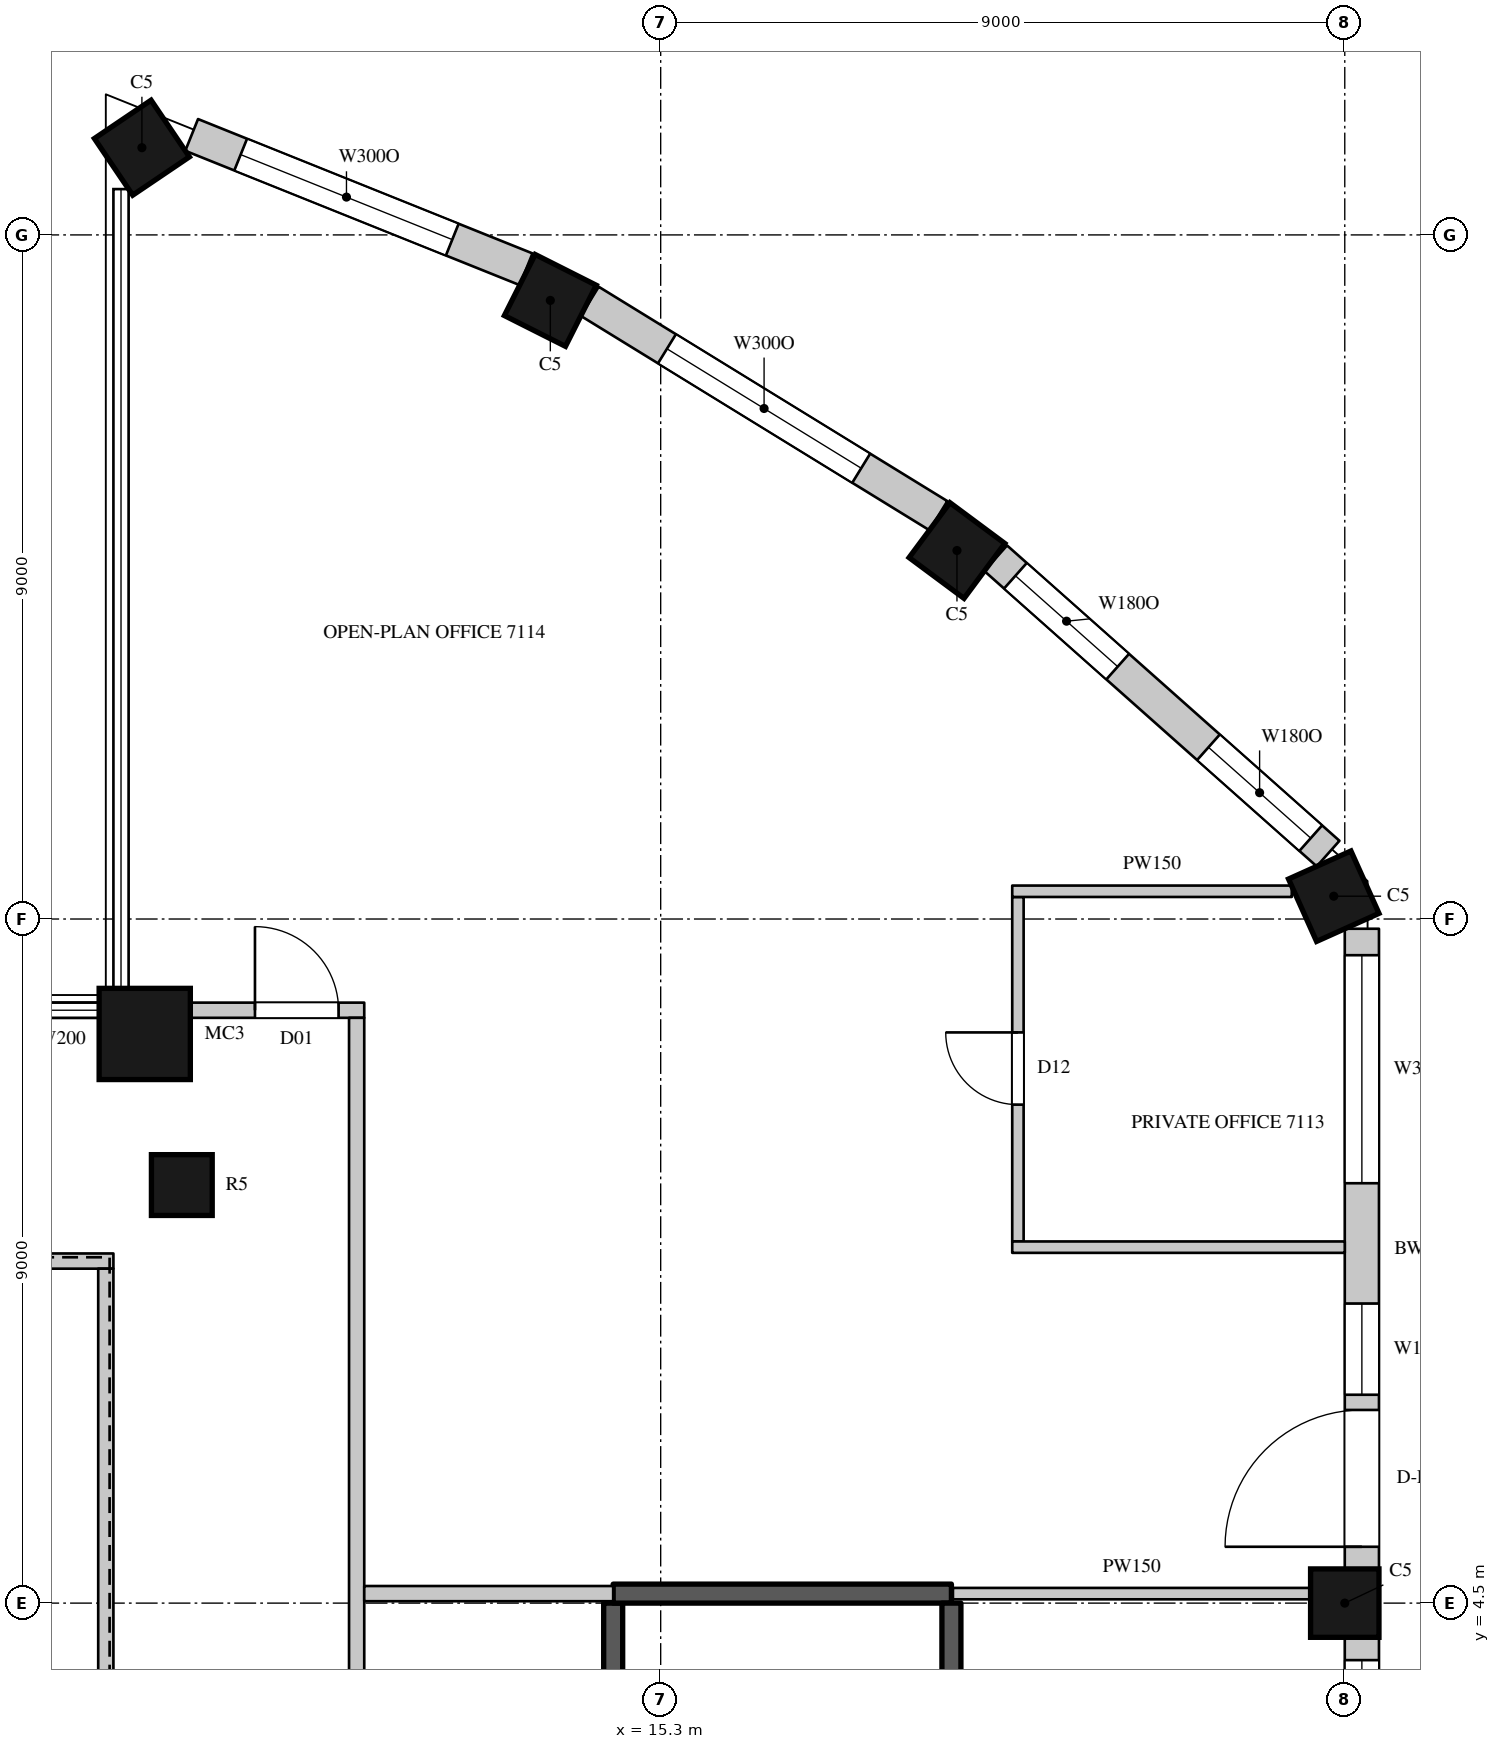
"""IFC4 building model, lengths in metres.
Left out: names, types, materials, properties, quantities, classifications, styles, units other than length and angle.
Written with IfcOpenShell. Run it as: python <this file> out.ifc"""

import sys

from ifc_helpers import new_model, si_unit, direction, frame, frame_2d, origin, origin_2d, place, context, subcontext, project, spatial, rectangle, circle, extrude, element, fill, save


model = new_model("IFC4")
c1 = context("Model", 3, precision=1e-05, world=origin(), true_north=direction((0.0, 1.0)))
c2 = subcontext(c1, "Body", "Model", "MODEL_VIEW")
j1 = project(units=[si_unit("LENGTHUNIT", "METRE"), si_unit("PLANEANGLEUNIT", "RADIAN")], contexts=[c1])
p1 = place(None, origin())
s1 = spatial("IfcSite", under=j1, at=p1, CompositionType="ELEMENT")
p2 = place(p1, origin())
s2 = spatial("IfcBuilding", under=s1, at=p2, CompositionType="ELEMENT")
p3 = place(p2, frame((0.0, 0.0, 313.1)))
s3 = spatial("IfcBuildingStorey", under=s2, at=p3, CompositionType="ELEMENT", Elevation=313.1)
p4 = place(p3, frame((8.475, 23.647, 0.0), z_axis=(0.0, 0.0, 1.0), x_axis=(-0.828469606019, -0.560034027451, 0.0)))
e1 = element("IfcColumn", 1, at=p4, inside=s3, PredefinedType="COLUMN", context=c2, shape_type="SweptSolid", body=[
    extrude(rectangle(XDim=0.9, YDim=0.9, at=origin_2d()), origin(), (0.0, 0.0, 1.0), 4.1),
])
p5 = place(p3, frame((8.512, 11.988, 0.0), z_axis=(0.0, 0.0, 1.0), x_axis=(1.0, 0.0, 0.0)))
e2 = element("IfcColumn", 2, at=p5, inside=s3, PredefinedType="COLUMN", context=c2, shape_type="SweptSolid", body=[
    extrude(circle(Radius=0.6, at=origin_2d()), origin(), (0.0, 0.0, 1.0), 4.1),
])
for number, where, z_axis, x_axis in (
    (3, (24.3, 4.5, 0.0), (0.0, 0.0, 1.0), (0.0, 1.0, 0.0)),
    (4, (24.155, 13.8, 0.0), (0.0, 0.0, 1.0), (-0.41, 0.912, 0.0)),
    (5, (19.198, 18.348, 0.0), (0.0, 0.0, 1.0), (-0.803, 0.596, 0.0)),
    (6, (13.848, 21.638, 0.0), (0.0, 0.0, 1.0), (-0.893, 0.45, 0.0)),
):
    element("IfcColumn", number, at=place(p3, frame(where, z_axis=z_axis, x_axis=x_axis)), inside=s3, PredefinedType="COLUMN", context=c2, shape_type="SweptSolid", body=[
        extrude(rectangle(XDim=0.9, YDim=0.9, at=origin_2d()), origin(), (0.0, 0.0, 1.0), 4.1),
    ])
p6 = place(p3, frame((9.0, 10.0, 0.0), z_axis=(0.0, 0.0, 1.0), x_axis=(1.0, 0.0, 0.0)))
e7 = element("IfcColumn", 7, at=p6, inside=s3, PredefinedType="COLUMN", context=c2, shape_type="SweptSolid", body=[
    extrude(circle(Radius=0.4, at=origin_2d()), origin(), (0.0, 0.0, 1.0), 4.1),
])
p7 = place(p3, frame((24.525, -4.05, 0.0), z_axis=(0.0, 0.0, 1.0), x_axis=(0.0, 1.0, 0.0)))
e8 = element("IfcWall", 8, at=p7, inside=s3, PredefinedType="SOLIDWALL", context=c2, shape_type="SweptSolid", body=[
    extrude(rectangle(XDim=8.1, YDim=0.45, at=frame_2d((4.05, 0.0))), origin(), (0.0, 0.0, 1.0), 3.8),
])
p8 = place(p7, frame((0.3, 0.0, 1.05)))
e9 = element("IfcOpeningElement", 9, at=p8, cuts=e8, PredefinedType="OPENING", context=c2, shape_type="SweptSolid", body=[
    extrude(rectangle(XDim=3.0, YDim=2.4, at=frame_2d((1.5, 1.2))), frame((0.0, 0.235, 0.0), z_axis=(0.0, -1.0, 0.0), x_axis=(1.0, 0.0, 0.0)), (0.0, 0.0, 1.0), 0.47),
])
p9 = place(p7, frame((4.8, 0.0, 1.05)))
e10 = element("IfcOpeningElement", 10, at=p9, cuts=e8, PredefinedType="OPENING", context=c2, shape_type="SweptSolid", body=[
    extrude(rectangle(XDim=3.0, YDim=2.4, at=frame_2d((1.5, 1.2))), frame((0.0, 0.235, 0.0), z_axis=(0.0, -1.0, 0.0), x_axis=(1.0, 0.0, 0.0)), (0.0, 0.0, 1.0), 0.47),
])
p10 = place(p3, frame((24.525, 4.95, 0.0), z_axis=(0.0, 0.0, 1.0), x_axis=(0.0, 1.0, 0.0)))
e11 = element("IfcWall", 11, at=p10, inside=s3, PredefinedType="SOLIDWALL", context=c2, shape_type="SweptSolid", body=[
    extrude(rectangle(XDim=8.422, YDim=0.45, at=frame_2d((4.211, 0.0))), origin(), (0.0, 0.0, 1.0), 3.8),
])
p11 = place(p10, frame((0.291, 0.0, 0.0)))
e12 = element("IfcOpeningElement", 12, at=p11, cuts=e11, PredefinedType="OPENING", context=c2, shape_type="SweptSolid", body=[
    extrude(rectangle(XDim=1.8, YDim=2.4, at=frame_2d((0.9, 1.2))), frame((0.0, 0.235, 0.0), z_axis=(0.0, -1.0, 0.0), x_axis=(1.0, 0.0, 0.0)), (0.0, 0.0, 1.0), 0.47),
])
p12 = place(p10, frame((2.291, 0.0, 1.05)))
e13 = element("IfcOpeningElement", 13, at=p12, cuts=e11, PredefinedType="OPENING", context=c2, shape_type="SweptSolid", body=[
    extrude(rectangle(XDim=1.2, YDim=2.4, at=frame_2d((0.6, 1.2))), frame((0.0, 0.235, 0.0), z_axis=(0.0, -1.0, 0.0), x_axis=(1.0, 0.0, 0.0)), (0.0, 0.0, 1.0), 0.47),
])
p13 = place(p10, frame((5.074, 0.0, 1.05)))
e14 = element("IfcOpeningElement", 14, at=p13, cuts=e11, PredefinedType="OPENING", context=c2, shape_type="SweptSolid", body=[
    extrude(rectangle(XDim=3.0, YDim=2.4, at=frame_2d((1.5, 1.2))), frame((0.0, 0.235, 0.0), z_axis=(0.0, -1.0, 0.0), x_axis=(1.0, 0.0, 0.0)), (0.0, 0.0, 1.0), 0.47),
])
p14 = place(p3, frame((24.081, 14.361, 0.0), z_axis=(0.0, 0.0, 1.0), x_axis=(-0.747570482973, 0.664182484704, 0.0)))
e15 = element("IfcWall", 15, at=p14, inside=s3, PredefinedType="SOLIDWALL", context=c2, shape_type="SweptSolid", body=[
    extrude(rectangle(XDim=5.85, YDim=0.45, at=frame_2d((2.925, 0.0))), origin(), (0.0, 0.0, 1.0), 3.8),
])
p15 = place(p14, frame((0.305, 0.0, 1.05)))
e16 = element("IfcOpeningElement", 16, at=p15, cuts=e15, PredefinedType="OPENING", context=c2, shape_type="SweptSolid", body=[
    extrude(rectangle(XDim=1.8, YDim=2.4, at=frame_2d((0.9, 1.2))), frame((0.0, 0.235, 0.0), z_axis=(0.0, -1.0, 0.0), x_axis=(1.0, 0.0, 0.0)), (0.0, 0.0, 1.0), 0.47),
])
p16 = place(p14, frame((3.703, 0.0, 1.05)))
e17 = element("IfcOpeningElement", 17, at=p16, cuts=e15, PredefinedType="OPENING", context=c2, shape_type="SweptSolid", body=[
    extrude(rectangle(XDim=1.8, YDim=2.4, at=frame_2d((0.9, 1.2))), frame((0.0, 0.235, 0.0), z_axis=(0.0, -1.0, 0.0), x_axis=(1.0, 0.0, 0.0)), (0.0, 0.0, 1.0), 0.47),
])
p17 = place(p3, frame((18.953, 18.806, 0.0), z_axis=(0.0, 0.0, 1.0), x_axis=(-0.851860664503, 0.523768468193, 0.0)))
e18 = element("IfcWall", 18, at=p17, inside=s3, PredefinedType="SOLIDWALL", context=c2, shape_type="SweptSolid", body=[
    extrude(rectangle(XDim=5.384, YDim=0.45, at=frame_2d((2.692, 0.0))), origin(), (0.0, 0.0, 1.0), 3.8),
])
p18 = place(p17, frame((1.192, 0.0, 1.05)))
e19 = element("IfcOpeningElement", 19, at=p18, cuts=e18, PredefinedType="OPENING", context=c2, shape_type="SweptSolid", body=[
    extrude(rectangle(XDim=3.0, YDim=2.4, at=frame_2d((1.5, 1.2))), frame((0.0, 0.235, 0.0), z_axis=(0.0, -1.0, 0.0), x_axis=(1.0, 0.0, 0.0)), (0.0, 0.0, 1.0), 0.47),
])
p19 = place(p3, frame((13.529, 22.048, 0.0), z_axis=(0.0, 0.0, 1.0), x_axis=(-0.927957332619, 0.372686448424, 0.0)))
e20 = element("IfcWall", 20, at=p19, inside=s3, PredefinedType="SOLIDWALL", context=c2, shape_type="SweptSolid", body=[
    extrude(rectangle(XDim=4.741, YDim=0.45, at=frame_2d((2.371, 0.0))), origin(), (0.0, 0.0, 1.0), 3.8),
])
p20 = place(p19, frame((1.047, 0.0, 1.05)))
e21 = element("IfcOpeningElement", 21, at=p20, cuts=e20, PredefinedType="OPENING", context=c2, shape_type="SweptSolid", body=[
    extrude(rectangle(XDim=3.0, YDim=2.4, at=frame_2d((1.5, 1.2))), frame((0.0, 0.235, 0.0), z_axis=(0.0, -1.0, 0.0), x_axis=(1.0, 0.0, 0.0)), (0.0, 0.0, 1.0), 0.47),
])
p21 = place(p3, frame((4.52, 9.0, 0.0), z_axis=(0.0, 0.0, 1.0), x_axis=(1.0, 0.0, 0.0)))
e22 = element("IfcWall", 22, at=p21, inside=s3, PredefinedType="PARTITIONING", context=c2, shape_type="SweptSolid", body=[
    extrude(rectangle(XDim=3.58, YDim=0.2, at=frame_2d((1.79, 0.0))), origin(), (0.0, 0.0, 1.0), 3.8),
])
p22 = place(p3, frame((6.75, 12.3, 0.0), z_axis=(0.0, 0.0, 1.0), x_axis=(1.0, 0.0, 0.0)))
e23 = element("IfcWall", 23, at=p22, inside=s3, PredefinedType="PARTITIONING", context=c2, shape_type="SweptSolid", body=[
    extrude(rectangle(XDim=1.212, YDim=0.2, at=frame_2d((0.606, 0.0))), origin(), (0.0, 0.0, 1.0), 3.8),
])
p23 = place(p3, frame((8.0, -8.9, 0.0), z_axis=(0.0, 0.0, 1.0), x_axis=(0.0, 1.0, 0.0)))
e24 = element("IfcWall", 24, at=p23, inside=s3, PredefinedType="PARTITIONING", context=c2, shape_type="SweptSolid", body=[
    extrude(rectangle(XDim=17.8, YDim=0.2, at=frame_2d((8.9, 0.0))), origin(), (0.0, 0.0, 1.0), 3.8),
])
p24 = place(p3, frame((9.062, 12.3, 0.0), z_axis=(0.0, 0.0, 1.0), x_axis=(1.0, 0.0, 0.0)))
e25 = element("IfcWall", 25, at=p24, inside=s3, PredefinedType="PARTITIONING", context=c2, shape_type="SweptSolid", body=[
    extrude(rectangle(XDim=2.338, YDim=0.2, at=frame_2d((1.169, 0.0))), origin(), (0.0, 0.0, 1.0), 3.8),
])
p25 = place(p24, frame((0.9, 0.0, 0.0)))
e26 = element("IfcOpeningElement", 26, at=p25, cuts=e25, PredefinedType="OPENING", context=c2, shape_type="SweptSolid", body=[
    extrude(rectangle(XDim=1.1, YDim=2.4, at=frame_2d((0.55, 1.2))), frame((0.0, 0.11, 0.0), z_axis=(0.0, -1.0, 0.0), x_axis=(1.0, 0.0, 0.0)), (0.0, 0.0, 1.0), 0.22),
])
p26 = place(p3, frame((11.3, -12.3, 0.0), z_axis=(0.0, 0.0, 1.0), x_axis=(0.0, 1.0, 0.0)))
e27 = element("IfcWall", 27, at=p26, inside=s3, PredefinedType="PARTITIONING", context=c2, shape_type="SweptSolid", body=[
    extrude(rectangle(XDim=24.5, YDim=0.2, at=frame_2d((12.25, 0.0))), origin(), (0.0, 0.0, 1.0), 3.8),
])
p27 = place(p26, frame((10.15, 0.0, 0.0)))
e28 = element("IfcOpeningElement", 28, at=p27, cuts=e27, PredefinedType="OPENING", context=c2, shape_type="SweptSolid", body=[
    extrude(rectangle(XDim=1.5, YDim=2.4, at=frame_2d((0.75, 1.2))), frame((0.0, 0.11, 0.0), z_axis=(0.0, -1.0, 0.0), x_axis=(1.0, 0.0, 0.0)), (0.0, 0.0, 1.0), 0.22),
])
p28 = place(p3, frame((11.4, 4.625, 0.0), z_axis=(0.0, 0.0, 1.0), x_axis=(1.0, 0.0, 0.0)))
e29 = element("IfcWall", 29, at=p28, inside=s3, PredefinedType="PARTITIONING", context=c2, shape_type="SweptSolid", body=[
    extrude(rectangle(XDim=3.275, YDim=0.2, at=frame_2d((1.638, 0.0))), origin(), (0.0, 0.0, 1.0), 3.8),
])
p29 = place(p3, frame((19.145, 4.625, 0.0), z_axis=(0.0, 0.0, 1.0), x_axis=(1.0, 0.0, 0.0)))
e30 = element("IfcWall", 30, at=p29, inside=s3, PredefinedType="PARTITIONING", context=c2, shape_type="SweptSolid", body=[
    extrude(rectangle(XDim=4.705, YDim=0.15, at=frame_2d((2.353, 0.0))), origin(), (0.0, 0.0, 1.0), 3.8),
])
p30 = place(p3, frame((20.0, 9.258, 0.0), z_axis=(0.0, 0.0, 1.0), x_axis=(0.0, 1.0, 0.0)))
e31 = element("IfcWall", 31, at=p30, inside=s3, PredefinedType="PARTITIONING", context=c2, shape_type="SweptSolid", body=[
    extrude(rectangle(XDim=4.532, YDim=0.15, at=frame_2d((2.266, 0.0))), origin(), (0.0, 0.0, 1.0), 3.8),
])
p31 = place(p30, frame((1.8, 0.0, 0.0)))
e32 = element("IfcOpeningElement", 32, at=p31, cuts=e31, PredefinedType="OPENING", context=c2, shape_type="SweptSolid", body=[
    extrude(rectangle(XDim=0.95, YDim=2.2, at=frame_2d((0.475, 1.1))), frame((0.0, 0.085, 0.0), z_axis=(0.0, -1.0, 0.0), x_axis=(1.0, 0.0, 0.0)), (0.0, 0.0, 1.0), 0.17),
])
p32 = place(p3, frame((19.925, 9.183, 0.0), z_axis=(0.0, 0.0, 1.0), x_axis=(1.0, 0.0, 0.0)))
e33 = element("IfcWall", 33, at=p32, inside=s3, PredefinedType="PARTITIONING", context=c2, shape_type="SweptSolid", body=[
    extrude(rectangle(XDim=4.375, YDim=0.15, at=frame_2d((2.188, 0.0))), origin(), (0.0, 0.0, 1.0), 3.15),
])
p33 = place(p3, frame((19.925, 13.865, 0.0), z_axis=(0.0, 0.0, 1.0), x_axis=(1.0, 0.0, 0.0)))
e34 = element("IfcWall", 34, at=p33, inside=s3, PredefinedType="PARTITIONING", context=c2, shape_type="SweptSolid", body=[
    extrude(rectangle(XDim=3.678, YDim=0.15, at=frame_2d((1.839, 0.0))), origin(), (0.0, 0.0, 1.0), 3.8),
])
p34 = place(p3, frame((14.675, -4.5, 0.0), z_axis=(0.0, 0.0, 1.0), x_axis=(0.0, 1.0, 0.0)))
e35 = element("IfcWall", 35, at=p34, inside=s3, PredefinedType="SHEAR", context=c2, shape_type="SweptSolid", body=[
    extrude(rectangle(XDim=9.0, YDim=0.25, at=frame_2d((4.5, 0.0))), origin(), (0.0, 0.0, 1.0), 3.8),
])
p35 = place(p34, frame((0.45, 0.0, 0.0)))
e36 = element("IfcOpeningElement", 36, at=p35, cuts=e35, PredefinedType="OPENING", context=c2, shape_type="SweptSolid", body=[
    extrude(rectangle(XDim=1.1, YDim=2.2, at=frame_2d((0.55, 1.1))), frame((0.0, 0.135, 0.0), z_axis=(0.0, -1.0, 0.0), x_axis=(1.0, 0.0, 0.0)), (0.0, 0.0, 1.0), 0.27),
])
p36 = place(p3, frame((14.675, 4.625, 0.0), z_axis=(0.0, 0.0, 1.0), x_axis=(1.0, 0.0, 0.0)))
e37 = element("IfcWall", 37, at=p36, inside=s3, PredefinedType="SHEAR", context=c2, shape_type="SweptSolid", body=[
    extrude(rectangle(XDim=4.45, YDim=0.25, at=frame_2d((2.225, 0.0))), origin(), (0.0, 0.0, 1.0), 3.8),
])
p37 = place(p3, frame((19.125, -4.5, 0.0), z_axis=(0.0, 0.0, 1.0), x_axis=(0.0, 1.0, 0.0)))
e38 = element("IfcWall", 38, at=p37, inside=s3, PredefinedType="SHEAR", context=c2, shape_type="SweptSolid", body=[
    extrude(rectangle(XDim=9.0, YDim=0.25, at=frame_2d((4.5, 0.0))), origin(), (0.0, 0.0, 1.0), 3.8),
])
p38 = place(p9, origin())
e39 = element("IfcWindow", 39, at=p38, inside=s3, PartitioningType="SINGLE_PANEL", PredefinedType="WINDOW", context=c2, shape_type="SweptSolid", body=[
    extrude(rectangle(XDim=3.0, YDim=2.4, at=frame_2d((1.5, 1.2))), frame((0.0, 0.135, 0.0), z_axis=(0.0, -1.0, 0.0), x_axis=(1.0, 0.0, 0.0)), (0.0, 0.0, 1.0), 0.06),
])
fill(e10, e39)
p39 = place(p11, origin())
e40 = element("IfcDoor", 40, at=p39, inside=s3, OperationType="SLIDING_TO_LEFT", PredefinedType="DOOR", context=c2, shape_type="SweptSolid", body=[
    extrude(rectangle(XDim=1.8, YDim=2.4, at=frame_2d((0.9, 1.2))), frame((0.0, 0.13, 0.0), z_axis=(0.0, -1.0, 0.0), x_axis=(1.0, 0.0, 0.0)), (0.0, 0.0, 1.0), 0.05),
])
fill(e12, e40)
p40 = place(p12, origin())
e41 = element("IfcWindow", 41, at=p40, inside=s3, PartitioningType="SINGLE_PANEL", PredefinedType="WINDOW", context=c2, shape_type="SweptSolid", body=[
    extrude(rectangle(XDim=1.2, YDim=2.4, at=frame_2d((0.6, 1.2))), frame((0.0, 0.135, 0.0), z_axis=(0.0, -1.0, 0.0), x_axis=(1.0, 0.0, 0.0)), (0.0, 0.0, 1.0), 0.06),
])
fill(e13, e41)
p41 = place(p13, origin())
e42 = element("IfcWindow", 42, at=p41, inside=s3, PartitioningType="SINGLE_PANEL", PredefinedType="WINDOW", context=c2, shape_type="SweptSolid", body=[
    extrude(rectangle(XDim=3.0, YDim=2.4, at=frame_2d((1.5, 1.2))), frame((0.0, 0.135, 0.0), z_axis=(0.0, -1.0, 0.0), x_axis=(1.0, 0.0, 0.0)), (0.0, 0.0, 1.0), 0.06),
])
fill(e14, e42)
p42 = place(p15, origin())
e43 = element("IfcWindow", 43, at=p42, inside=s3, PartitioningType="SINGLE_PANEL", PredefinedType="WINDOW", context=c2, shape_type="SweptSolid", body=[
    extrude(rectangle(XDim=1.8, YDim=2.4, at=frame_2d((0.9, 1.2))), frame((0.0, 0.135, 0.0), z_axis=(0.0, -1.0, 0.0), x_axis=(1.0, 0.0, 0.0)), (0.0, 0.0, 1.0), 0.06),
])
fill(e16, e43)
p43 = place(p16, origin())
e44 = element("IfcWindow", 44, at=p43, inside=s3, PartitioningType="SINGLE_PANEL", PredefinedType="WINDOW", context=c2, shape_type="SweptSolid", body=[
    extrude(rectangle(XDim=1.8, YDim=2.4, at=frame_2d((0.9, 1.2))), frame((0.0, 0.135, 0.0), z_axis=(0.0, -1.0, 0.0), x_axis=(1.0, 0.0, 0.0)), (0.0, 0.0, 1.0), 0.06),
])
fill(e17, e44)
p44 = place(p18, origin())
e45 = element("IfcWindow", 45, at=p44, inside=s3, PartitioningType="SINGLE_PANEL", PredefinedType="WINDOW", context=c2, shape_type="SweptSolid", body=[
    extrude(rectangle(XDim=3.0, YDim=2.4, at=frame_2d((1.5, 1.2))), frame((0.0, 0.135, 0.0), z_axis=(0.0, -1.0, 0.0), x_axis=(1.0, 0.0, 0.0)), (0.0, 0.0, 1.0), 0.06),
])
fill(e19, e45)
p45 = place(p20, origin())
e46 = element("IfcWindow", 46, at=p45, inside=s3, PartitioningType="SINGLE_PANEL", PredefinedType="WINDOW", context=c2, shape_type="SweptSolid", body=[
    extrude(rectangle(XDim=3.0, YDim=2.4, at=frame_2d((1.5, 1.2))), frame((0.0, 0.135, 0.0), z_axis=(0.0, -1.0, 0.0), x_axis=(1.0, 0.0, 0.0)), (0.0, 0.0, 1.0), 0.06),
])
fill(e21, e46)
p46 = place(p25, origin())
e47 = element("IfcDoor", 47, at=p46, inside=s3, OperationType="SINGLE_SWING_LEFT", PredefinedType="DOOR", context=c2, shape_type="SweptSolid", body=[
    extrude(rectangle(XDim=1.1, YDim=2.4, at=frame_2d((0.55, 1.2))), frame((0.0, 0.025, 0.0), z_axis=(0.0, -1.0, 0.0), x_axis=(1.0, 0.0, 0.0)), (0.0, 0.0, 1.0), 0.05),
])
fill(e26, e47)
p47 = place(p31, origin())
e48 = element("IfcDoor", 48, at=p47, inside=s3, OperationType="SINGLE_SWING_RIGHT", PredefinedType="DOOR", context=c2, shape_type="SweptSolid", body=[
    extrude(rectangle(XDim=0.95, YDim=2.2, at=frame_2d((0.475, 1.1))), frame((0.0, 0.025, 0.0), z_axis=(0.0, -1.0, 0.0), x_axis=(1.0, 0.0, 0.0)), (0.0, 0.0, 1.0), 0.05),
])
fill(e32, e48)
save(model, sys.argv[1])
